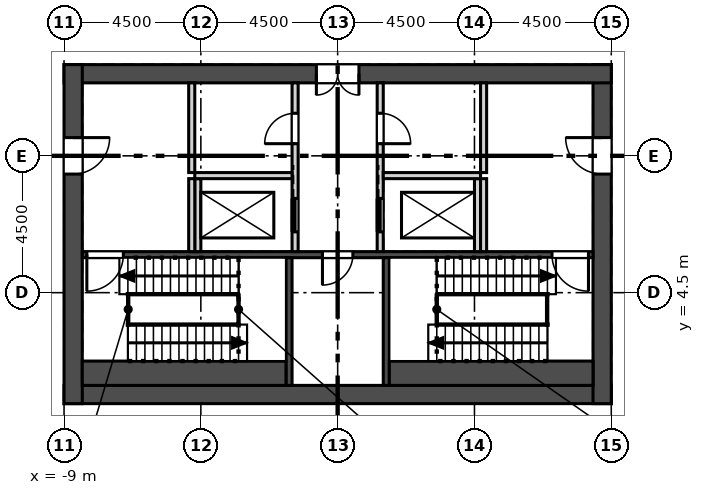
"""IFC4 building model, lengths in metres.
Left out: names, types, materials, properties, quantities, classifications, styles, units other than length and angle.
Written with IfcOpenShell. Run it as: python <this file> out.ifc"""

import sys

from ifc_helpers import new_model, si_unit, direction, frame, frame_2d, origin, place, context, subcontext, project, spatial, rectangle, extrude, element, fill, save


model = new_model("IFC4")
c1 = context("Model", 3, precision=1e-05, world=origin(), true_north=direction((0.0, 1.0)))
c2 = subcontext(c1, "Body", "Model", "MODEL_VIEW")
j1 = project(units=[si_unit("LENGTHUNIT", "METRE"), si_unit("PLANEANGLEUNIT", "RADIAN")], contexts=[c1])
p1 = place(None, origin())
s1 = spatial("IfcSite", under=j1, at=p1, CompositionType="ELEMENT")
p2 = place(p1, origin())
s2 = spatial("IfcBuilding", under=s1, at=p2, CompositionType="ELEMENT")
p3 = place(p2, frame((0.0, 0.0, 355.1)))
s3 = spatial("IfcBuildingStorey", under=s2, at=p3, CompositionType="ELEMENT", Elevation=355.1)
p4 = place(p3, frame((-9.0, 1.15, 0.0), z_axis=(0.0, 0.0, 1.0), x_axis=(1.0, 0.0, 0.0)))
e1 = element("IfcWall", 1, at=p4, inside=s3, PredefinedType="SHEAR", context=c2, shape_type="SweptSolid", body=[
    extrude(rectangle(XDim=18.0, YDim=0.6, at=frame_2d((9.0, 0.0))), origin(), (0.0, 0.0, 1.0), 4.5),
])
p5 = place(p3, frame((8.7, 0.85, 0.0), z_axis=(0.0, 0.0, 1.0), x_axis=(0.0, 1.0, 0.0)))
e2 = element("IfcWall", 2, at=p5, inside=s3, PredefinedType="SHEAR", context=c2, shape_type="SweptSolid", body=[
    extrude(rectangle(XDim=11.15, YDim=0.6, at=frame_2d((5.575, 0.0))), origin(), (0.0, 0.0, 1.0), 4.5),
])
p6 = place(p5, frame((7.55, 0.0, 0.0)))
e3 = element("IfcOpeningElement", 3, at=p6, cuts=e2, PredefinedType="OPENING", context=c2, shape_type="SweptSolid", body=[
    extrude(rectangle(XDim=1.2, YDim=2.1, at=frame_2d((0.6, 1.05))), frame((0.0, 0.31, 0.0), z_axis=(0.0, -1.0, 0.0), x_axis=(1.0, 0.0, 0.0)), (0.0, 0.0, 1.0), 0.62),
])
p7 = place(p3, frame((9.0, 11.7, 0.0), z_axis=(0.0, 0.0, 1.0), x_axis=(-1.0, 0.0, 0.0)))
e4 = element("IfcWall", 4, at=p7, inside=s3, PredefinedType="SHEAR", context=c2, shape_type="SweptSolid", body=[
    extrude(rectangle(XDim=18.0, YDim=0.6, at=frame_2d((9.0, 0.0))), origin(), (0.0, 0.0, 1.0), 4.5),
])
p8 = place(p7, frame((8.3, 0.0, 0.0)))
e5 = element("IfcOpeningElement", 5, at=p8, cuts=e4, PredefinedType="OPENING", context=c2, shape_type="SweptSolid", body=[
    extrude(rectangle(XDim=1.4, YDim=2.1, at=frame_2d((0.7, 1.05))), frame((0.0, 0.31, 0.0), z_axis=(0.0, -1.0, 0.0), x_axis=(1.0, 0.0, 0.0)), (0.0, 0.0, 1.0), 0.62),
])
p9 = place(p3, frame((-8.7, 12.0, 0.0), z_axis=(0.0, 0.0, 1.0), x_axis=(0.0, -1.0, 0.0)))
e6 = element("IfcWall", 6, at=p9, inside=s3, PredefinedType="SHEAR", context=c2, shape_type="SweptSolid", body=[
    extrude(rectangle(XDim=11.15, YDim=0.6, at=frame_2d((5.575, 0.0))), origin(), (0.0, 0.0, 1.0), 4.5),
])
p10 = place(p9, frame((2.4, 0.0, 0.0)))
e7 = element("IfcOpeningElement", 7, at=p10, cuts=e6, PredefinedType="OPENING", context=c2, shape_type="SweptSolid", body=[
    extrude(rectangle(XDim=1.2, YDim=2.1, at=frame_2d((0.6, 1.05))), frame((0.0, 0.31, 0.0), z_axis=(0.0, -1.0, 0.0), x_axis=(1.0, 0.0, 0.0)), (0.0, 0.0, 1.0), 0.62),
])
p11 = place(p3, frame((16.353, 7.709, 0.0), z_axis=(0.0, 0.0, 1.0), x_axis=(-0.49999894854, 0.866026010844, 0.0)))
e8 = element("IfcWall", 8, at=p11, inside=s3, PredefinedType="SOLIDWALL", context=c2, shape_type="SweptSolid", body=[
    extrude(rectangle(XDim=24.0, YDim=0.34, at=frame_2d((12.0, 0.0))), origin(), (0.0, 0.0, 1.0), 3.9),
])
p12 = place(p11, frame((2.5, 0.0, 0.9)))
e9 = element("IfcOpeningElement", 9, at=p12, cuts=e8, PredefinedType="OPENING", context=c2, shape_type="SweptSolid", body=[
    extrude(rectangle(XDim=1.885, YDim=3.0, at=frame_2d((0.942, 1.5))), frame((0.0, 0.18, 0.0), z_axis=(0.0, -1.0, 0.0), x_axis=(1.0, 0.0, 0.0)), (0.0, 0.0, 1.0), 0.36),
])
p13 = place(p11, frame((5.5, 0.0, 0.9)))
e10 = element("IfcOpeningElement", 10, at=p13, cuts=e8, PredefinedType="OPENING", context=c2, shape_type="SweptSolid", body=[
    extrude(rectangle(XDim=1.885, YDim=3.0, at=frame_2d((0.942, 1.5))), frame((0.0, 0.18, 0.0), z_axis=(0.0, -1.0, 0.0), x_axis=(1.0, 0.0, 0.0)), (0.0, 0.0, 1.0), 0.36),
])
p14 = place(p11, frame((14.5, 0.0, 0.9)))
e11 = element("IfcOpeningElement", 11, at=p14, cuts=e8, PredefinedType="OPENING", context=c2, shape_type="SweptSolid", body=[
    extrude(rectangle(XDim=1.885, YDim=3.0, at=frame_2d((0.942, 1.5))), frame((0.0, 0.18, 0.0), z_axis=(0.0, -1.0, 0.0), x_axis=(1.0, 0.0, 0.0)), (0.0, 0.0, 1.0), 0.36),
])
p15 = place(p11, frame((17.5, 0.0, 0.9)))
e12 = element("IfcOpeningElement", 12, at=p15, cuts=e8, PredefinedType="OPENING", context=c2, shape_type="SweptSolid", body=[
    extrude(rectangle(XDim=1.885, YDim=3.0, at=frame_2d((0.942, 1.5))), frame((0.0, 0.18, 0.0), z_axis=(0.0, -1.0, 0.0), x_axis=(1.0, 0.0, 0.0)), (0.0, 0.0, 1.0), 0.36),
])
p16 = place(p11, frame((20.5, 0.0, 0.9)))
e13 = element("IfcOpeningElement", 13, at=p16, cuts=e8, PredefinedType="OPENING", context=c2, shape_type="SweptSolid", body=[
    extrude(rectangle(XDim=1.885, YDim=3.0, at=frame_2d((0.942, 1.5))), frame((0.0, 0.18, 0.0), z_axis=(0.0, -1.0, 0.0), x_axis=(1.0, 0.0, 0.0)), (0.0, 0.0, 1.0), 0.36),
])
p17 = place(p11, frame((9.7, 0.0, 0.0)))
e14 = element("IfcOpeningElement", 14, at=p17, cuts=e8, PredefinedType="OPENING", context=c2, shape_type="SweptSolid", body=[
    extrude(rectangle(XDim=1.885, YDim=2.6, at=frame_2d((0.942, 1.3))), frame((0.0, 0.18, 0.0), z_axis=(0.0, -1.0, 0.0), x_axis=(1.0, 0.0, 0.0)), (0.0, 0.0, 1.0), 0.36),
])
p18 = place(p3, frame((-4.353, 28.494, 0.0), z_axis=(0.0, 0.0, 1.0), x_axis=(-0.49999894854, -0.866026010844, 0.0)))
e15 = element("IfcWall", 15, at=p18, inside=s3, PredefinedType="SOLIDWALL", context=c2, shape_type="SweptSolid", body=[
    extrude(rectangle(XDim=24.0, YDim=0.34, at=frame_2d((12.0, 0.0))), origin(), (0.0, 0.0, 1.0), 3.9),
])
p19 = place(p18, frame((1.5, 0.0, 0.9)))
e16 = element("IfcOpeningElement", 16, at=p19, cuts=e15, PredefinedType="OPENING", context=c2, shape_type="SweptSolid", body=[
    extrude(rectangle(XDim=1.885, YDim=3.0, at=frame_2d((0.942, 1.5))), frame((0.0, 0.18, 0.0), z_axis=(0.0, -1.0, 0.0), x_axis=(1.0, 0.0, 0.0)), (0.0, 0.0, 1.0), 0.36),
])
p20 = place(p18, frame((4.5, 0.0, 0.9)))
e17 = element("IfcOpeningElement", 17, at=p20, cuts=e15, PredefinedType="OPENING", context=c2, shape_type="SweptSolid", body=[
    extrude(rectangle(XDim=1.885, YDim=3.0, at=frame_2d((0.942, 1.5))), frame((0.0, 0.18, 0.0), z_axis=(0.0, -1.0, 0.0), x_axis=(1.0, 0.0, 0.0)), (0.0, 0.0, 1.0), 0.36),
])
p21 = place(p18, frame((13.5, 0.0, 0.9)))
e18 = element("IfcOpeningElement", 18, at=p21, cuts=e15, PredefinedType="OPENING", context=c2, shape_type="SweptSolid", body=[
    extrude(rectangle(XDim=1.885, YDim=3.0, at=frame_2d((0.942, 1.5))), frame((0.0, 0.18, 0.0), z_axis=(0.0, -1.0, 0.0), x_axis=(1.0, 0.0, 0.0)), (0.0, 0.0, 1.0), 0.36),
])
p22 = place(p18, frame((16.5, 0.0, 0.9)))
e19 = element("IfcOpeningElement", 19, at=p22, cuts=e15, PredefinedType="OPENING", context=c2, shape_type="SweptSolid", body=[
    extrude(rectangle(XDim=1.885, YDim=3.0, at=frame_2d((0.942, 1.5))), frame((0.0, 0.18, 0.0), z_axis=(0.0, -1.0, 0.0), x_axis=(1.0, 0.0, 0.0)), (0.0, 0.0, 1.0), 0.36),
])
p23 = place(p18, frame((19.5, 0.0, 0.9)))
e20 = element("IfcOpeningElement", 20, at=p23, cuts=e15, PredefinedType="OPENING", context=c2, shape_type="SweptSolid", body=[
    extrude(rectangle(XDim=1.885, YDim=3.0, at=frame_2d((0.942, 1.5))), frame((0.0, 0.18, 0.0), z_axis=(0.0, -1.0, 0.0), x_axis=(1.0, 0.0, 0.0)), (0.0, 0.0, 1.0), 0.36),
])
p24 = place(p18, frame((9.7, 0.0, 0.0)))
e21 = element("IfcOpeningElement", 21, at=p24, cuts=e15, PredefinedType="OPENING", context=c2, shape_type="SweptSolid", body=[
    extrude(rectangle(XDim=1.885, YDim=2.6, at=frame_2d((0.942, 1.3))), frame((0.0, 0.18, 0.0), z_axis=(0.0, -1.0, 0.0), x_axis=(1.0, 0.0, 0.0)), (0.0, 0.0, 1.0), 0.36),
])
p25 = place(p3, frame((-8.4, 5.75, -0.6), z_axis=(0.0, 0.0, 1.0), x_axis=(1.0, 0.0, 0.0)))
e22 = element("IfcWall", 22, at=p25, inside=s3, PredefinedType="SOLIDWALL", context=c2, shape_type="SweptSolid", body=[
    extrude(rectangle(XDim=16.8, YDim=0.2, at=frame_2d((8.4, 0.0))), origin(), (0.0, 0.0, 1.0), 4.5),
])
p26 = place(p25, frame((7.9, 0.0, 0.6)))
e23 = element("IfcOpeningElement", 23, at=p26, cuts=e22, PredefinedType="OPENING", context=c2, shape_type="SweptSolid", body=[
    extrude(rectangle(XDim=1.0, YDim=2.1, at=frame_2d((0.5, 1.05))), frame((0.0, 0.11, 0.0), z_axis=(0.0, -1.0, 0.0), x_axis=(1.0, 0.0, 0.0)), (0.0, 0.0, 1.0), 0.22),
])
p27 = place(p25, frame((0.15, 0.0, 0.6)))
e24 = element("IfcOpeningElement", 24, at=p27, cuts=e22, PredefinedType="OPENING", context=c2, shape_type="SweptSolid", body=[
    extrude(rectangle(XDim=1.2, YDim=2.1, at=frame_2d((0.6, 1.05))), frame((0.0, 0.11, 0.0), z_axis=(0.0, -1.0, 0.0), x_axis=(1.0, 0.0, 0.0)), (0.0, 0.0, 1.0), 0.22),
])
p28 = place(p25, frame((15.45, 0.0, 0.6)))
e25 = element("IfcOpeningElement", 25, at=p28, cuts=e22, PredefinedType="OPENING", context=c2, shape_type="SweptSolid", body=[
    extrude(rectangle(XDim=1.2, YDim=2.1, at=frame_2d((0.6, 1.05))), frame((0.0, 0.11, 0.0), z_axis=(0.0, -1.0, 0.0), x_axis=(1.0, 0.0, 0.0)), (0.0, 0.0, 1.0), 0.22),
])
p29 = place(p3, frame((-1.6, 1.45, -0.6), z_axis=(0.0, 0.0, 1.0), x_axis=(0.0, 1.0, 0.0)))
e26 = element("IfcWall", 26, at=p29, inside=s3, PredefinedType="SOLIDWALL", context=c2, shape_type="SweptSolid", body=[
    extrude(rectangle(XDim=4.2, YDim=0.2, at=frame_2d((2.1, 0.0))), origin(), (0.0, 0.0, 1.0), 4.5),
])
p30 = place(p3, frame((-8.4, 1.85, -0.6), z_axis=(0.0, 0.0, 1.0), x_axis=(1.0, 0.0, 0.0)))
e27 = element("IfcWall", 27, at=p30, inside=s3, PredefinedType="SOLIDWALL", context=c2, shape_type="SweptSolid", body=[
    extrude(rectangle(XDim=6.7, YDim=0.8, at=frame_2d((3.35, 0.0))), origin(), (0.0, 0.0, 1.0), 4.5),
])
p31 = place(p3, frame((1.6, 1.45, -0.6), z_axis=(0.0, 0.0, 1.0), x_axis=(0.0, 1.0, 0.0)))
e28 = element("IfcWall", 28, at=p31, inside=s3, PredefinedType="SOLIDWALL", context=c2, shape_type="SweptSolid", body=[
    extrude(rectangle(XDim=4.2, YDim=0.2, at=frame_2d((2.1, 0.0))), origin(), (0.0, 0.0, 1.0), 4.5),
])
p32 = place(p3, frame((1.7, 1.85, -0.6), z_axis=(0.0, 0.0, 1.0), x_axis=(1.0, 0.0, 0.0)))
e29 = element("IfcWall", 29, at=p32, inside=s3, PredefinedType="SOLIDWALL", context=c2, shape_type="SweptSolid", body=[
    extrude(rectangle(XDim=6.7, YDim=0.8, at=frame_2d((3.35, 0.0))), origin(), (0.0, 0.0, 1.0), 4.5),
])
p33 = place(p3, frame((-1.4, 5.85, 0.0), z_axis=(0.0, 0.0, 1.0), x_axis=(0.0, 1.0, 0.0)))
e30 = element("IfcWall", 30, at=p33, inside=s3, PredefinedType="SOLIDWALL", context=c2, shape_type="SweptSolid", body=[
    extrude(rectangle(XDim=5.55, YDim=0.2, at=frame_2d((2.775, 0.0))), origin(), (0.0, 0.0, 1.0), 3.9),
])
p34 = place(p33, frame((0.65, 0.0, 0.0)))
e31 = element("IfcOpeningElement", 31, at=p34, cuts=e30, PredefinedType="OPENING", context=c2, shape_type="SweptSolid", body=[
    extrude(rectangle(XDim=1.1, YDim=2.1, at=frame_2d((0.55, 1.05))), frame((0.0, 0.11, 0.0), z_axis=(0.0, -1.0, 0.0), x_axis=(1.0, 0.0, 0.0)), (0.0, 0.0, 1.0), 0.22),
])
p35 = place(p33, frame((3.55, 0.0, 0.0)))
e32 = element("IfcOpeningElement", 32, at=p35, cuts=e30, PredefinedType="OPENING", context=c2, shape_type="SweptSolid", body=[
    extrude(rectangle(XDim=1.0, YDim=2.1, at=frame_2d((0.5, 1.05))), frame((0.0, 0.11, 0.0), z_axis=(0.0, -1.0, 0.0), x_axis=(1.0, 0.0, 0.0)), (0.0, 0.0, 1.0), 0.22),
])
p36 = place(p3, frame((1.4, 5.85, 0.0), z_axis=(0.0, 0.0, 1.0), x_axis=(0.0, 1.0, 0.0)))
e33 = element("IfcWall", 33, at=p36, inside=s3, PredefinedType="SOLIDWALL", context=c2, shape_type="SweptSolid", body=[
    extrude(rectangle(XDim=5.55, YDim=0.2, at=frame_2d((2.775, 0.0))), origin(), (0.0, 0.0, 1.0), 3.9),
])
p37 = place(p36, frame((0.65, 0.0, 0.0)))
e34 = element("IfcOpeningElement", 34, at=p37, cuts=e33, PredefinedType="OPENING", context=c2, shape_type="SweptSolid", body=[
    extrude(rectangle(XDim=1.1, YDim=2.1, at=frame_2d((0.55, 1.05))), frame((0.0, 0.11, 0.0), z_axis=(0.0, -1.0, 0.0), x_axis=(1.0, 0.0, 0.0)), (0.0, 0.0, 1.0), 0.22),
])
p38 = place(p36, frame((3.55, 0.0, 0.0)))
e35 = element("IfcOpeningElement", 35, at=p38, cuts=e33, PredefinedType="OPENING", context=c2, shape_type="SweptSolid", body=[
    extrude(rectangle(XDim=1.0, YDim=2.1, at=frame_2d((0.5, 1.05))), frame((0.0, 0.11, 0.0), z_axis=(0.0, -1.0, 0.0), x_axis=(1.0, 0.0, 0.0)), (0.0, 0.0, 1.0), 0.22),
])
for number, where, z_axis, x_axis in (
    (36, (-4.6, 5.85, 0.0), (0.0, 0.0, 1.0), (0.0, 1.0, 0.0)),
    (37, (4.6, 5.85, 0.0), (0.0, 0.0, 1.0), (0.0, 1.0, 0.0)),
):
    element("IfcWall", number, at=place(p3, frame(where, z_axis=z_axis, x_axis=x_axis)), inside=s3, PredefinedType="SOLIDWALL", context=c2, shape_type="SweptSolid", body=[
        extrude(rectangle(XDim=2.4, YDim=0.2, at=frame_2d((1.2, 0.0))), origin(), (0.0, 0.0, 1.0), 3.9),
    ])
for number, where, z_axis, x_axis in (
    (38, (-4.7, 8.35, 0.0), (0.0, 0.0, 1.0), (1.0, 0.0, 0.0)),
    (39, (1.5, 8.35, 0.0), (0.0, 0.0, 1.0), (1.0, 0.0, 0.0)),
):
    element("IfcWall", number, at=place(p3, frame(where, z_axis=z_axis, x_axis=x_axis)), inside=s3, PredefinedType="SOLIDWALL", context=c2, shape_type="SweptSolid", body=[
        extrude(rectangle(XDim=3.2, YDim=0.2, at=frame_2d((1.6, 0.0))), origin(), (0.0, 0.0, 1.0), 3.9),
    ])
for number, where, z_axis, x_axis in (
    (40, (-4.8, 8.45, 0.0), (0.0, 0.0, 1.0), (0.0, 1.0, 0.0)),
    (41, (4.8, 8.45, 0.0), (0.0, 0.0, 1.0), (0.0, 1.0, 0.0)),
):
    element("IfcWall", number, at=place(p3, frame(where, z_axis=z_axis, x_axis=x_axis)), inside=s3, PredefinedType="SOLIDWALL", context=c2, shape_type="SweptSolid", body=[
        extrude(rectangle(XDim=2.95, YDim=0.2, at=frame_2d((1.475, 0.0))), origin(), (0.0, 0.0, 1.0), 3.9),
    ])
for number, where, z_axis, x_axis in (
    (42, (-4.8, 5.85, 0.0), (0.0, 0.0, 1.0), (0.0, 1.0, 0.0)),
    (43, (4.8, 5.85, 0.0), (0.0, 0.0, 1.0), (0.0, 1.0, 0.0)),
):
    element("IfcWall", number, at=place(p3, frame(where, z_axis=z_axis, x_axis=x_axis)), inside=s3, PredefinedType="SOLIDWALL", context=c2, shape_type="SweptSolid", body=[
        extrude(rectangle(XDim=2.4, YDim=0.2, at=frame_2d((1.2, 0.0))), origin(), (0.0, 0.0, 1.0), 3.9),
    ])
p39 = place(p34, origin())
e44 = element("IfcDoor", 44, at=p39, inside=s3, OperationType="SLIDING_TO_RIGHT", PredefinedType="DOOR", context=c2, shape_type="SweptSolid", body=[
    extrude(rectangle(XDim=1.1, YDim=2.1, at=frame_2d((0.55, 1.05))), frame((0.0, 0.025, 0.0), z_axis=(0.0, -1.0, 0.0), x_axis=(1.0, 0.0, 0.0)), (0.0, 0.0, 1.0), 0.05),
])
fill(e31, e44)
p40 = place(p37, origin())
e45 = element("IfcDoor", 45, at=p40, inside=s3, OperationType="SLIDING_TO_RIGHT", PredefinedType="DOOR", context=c2, shape_type="SweptSolid", body=[
    extrude(rectangle(XDim=1.1, YDim=2.1, at=frame_2d((0.55, 1.05))), frame((0.0, 0.025, 0.0), z_axis=(0.0, -1.0, 0.0), x_axis=(1.0, 0.0, 0.0)), (0.0, 0.0, 1.0), 0.05),
])
fill(e34, e45)
p41 = place(p26, frame((1.0, 0.0, 0.0), z_axis=(0.0, 0.0, 1.0), x_axis=(-1.0, 0.0, 0.0)))
e46 = element("IfcDoor", 46, at=p41, inside=s3, OperationType="SINGLE_SWING_RIGHT", PredefinedType="DOOR", context=c2, shape_type="SweptSolid", body=[
    extrude(rectangle(XDim=1.0, YDim=2.1, at=frame_2d((0.5, 1.05))), frame((0.0, 0.025, 0.0), z_axis=(0.0, -1.0, 0.0), x_axis=(1.0, 0.0, 0.0)), (0.0, 0.0, 1.0), 0.05),
])
fill(e23, e46)
p42 = place(p10, origin())
e47 = element("IfcDoor", 47, at=p42, inside=s3, OperationType="SINGLE_SWING_LEFT", PredefinedType="DOOR", context=c2, shape_type="SweptSolid", body=[
    extrude(rectangle(XDim=1.2, YDim=2.1, at=frame_2d((0.6, 1.05))), frame((0.0, 0.025, 0.0), z_axis=(0.0, -1.0, 0.0), x_axis=(1.0, 0.0, 0.0)), (0.0, 0.0, 1.0), 0.05),
])
fill(e7, e47)
p43 = place(p27, frame((1.2, 0.0, 0.0), z_axis=(0.0, 0.0, 1.0), x_axis=(-1.0, 0.0, 0.0)))
e48 = element("IfcDoor", 48, at=p43, inside=s3, OperationType="SINGLE_SWING_RIGHT", PredefinedType="DOOR", context=c2, shape_type="SweptSolid", body=[
    extrude(rectangle(XDim=1.2, YDim=2.1, at=frame_2d((0.6, 1.05))), frame((0.0, 0.025, 0.0), z_axis=(0.0, -1.0, 0.0), x_axis=(1.0, 0.0, 0.0)), (0.0, 0.0, 1.0), 0.05),
])
fill(e24, e48)
p44 = place(p35, origin())
e49 = element("IfcDoor", 49, at=p44, inside=s3, OperationType="SINGLE_SWING_LEFT", PredefinedType="DOOR", context=c2, shape_type="SweptSolid", body=[
    extrude(rectangle(XDim=1.0, YDim=2.1, at=frame_2d((0.5, 1.05))), frame((0.0, 0.025, 0.0), z_axis=(0.0, -1.0, 0.0), x_axis=(1.0, 0.0, 0.0)), (0.0, 0.0, 1.0), 0.05),
])
fill(e32, e49)
p45 = place(p6, origin())
e50 = element("IfcDoor", 50, at=p45, inside=s3, OperationType="SINGLE_SWING_RIGHT", PredefinedType="DOOR", context=c2, shape_type="SweptSolid", body=[
    extrude(rectangle(XDim=1.2, YDim=2.1, at=frame_2d((0.6, 1.05))), frame((0.0, 0.025, 0.0), z_axis=(0.0, -1.0, 0.0), x_axis=(1.0, 0.0, 0.0)), (0.0, 0.0, 1.0), 0.05),
])
fill(e3, e50)
p46 = place(p28, frame((1.2, 0.0, 0.0), z_axis=(0.0, 0.0, 1.0), x_axis=(-1.0, 0.0, 0.0)))
e51 = element("IfcDoor", 51, at=p46, inside=s3, OperationType="SINGLE_SWING_LEFT", PredefinedType="DOOR", context=c2, shape_type="SweptSolid", body=[
    extrude(rectangle(XDim=1.2, YDim=2.1, at=frame_2d((0.6, 1.05))), frame((0.0, 0.025, 0.0), z_axis=(0.0, -1.0, 0.0), x_axis=(1.0, 0.0, 0.0)), (0.0, 0.0, 1.0), 0.05),
])
fill(e25, e51)
p47 = place(p38, frame((1.0, 0.0, 0.0), z_axis=(0.0, 0.0, 1.0), x_axis=(-1.0, 0.0, 0.0)))
e52 = element("IfcDoor", 52, at=p47, inside=s3, OperationType="SINGLE_SWING_RIGHT", PredefinedType="DOOR", context=c2, shape_type="SweptSolid", body=[
    extrude(rectangle(XDim=1.0, YDim=2.1, at=frame_2d((0.5, 1.05))), frame((0.0, 0.025, 0.0), z_axis=(0.0, -1.0, 0.0), x_axis=(1.0, 0.0, 0.0)), (0.0, 0.0, 1.0), 0.05),
])
fill(e35, e52)
p48 = place(p8, origin())
e53 = element("IfcDoor", 53, at=p48, inside=s3, OperationType="DOUBLE_DOOR_SINGLE_SWING", PredefinedType="DOOR", context=c2, shape_type="SweptSolid", body=[
    extrude(rectangle(XDim=1.4, YDim=2.1, at=frame_2d((0.7, 1.05))), frame((0.0, 0.025, 0.0), z_axis=(0.0, -1.0, 0.0), x_axis=(1.0, 0.0, 0.0)), (0.0, 0.0, 1.0), 0.05),
])
fill(e5, e53)
save(model, sys.argv[1])
